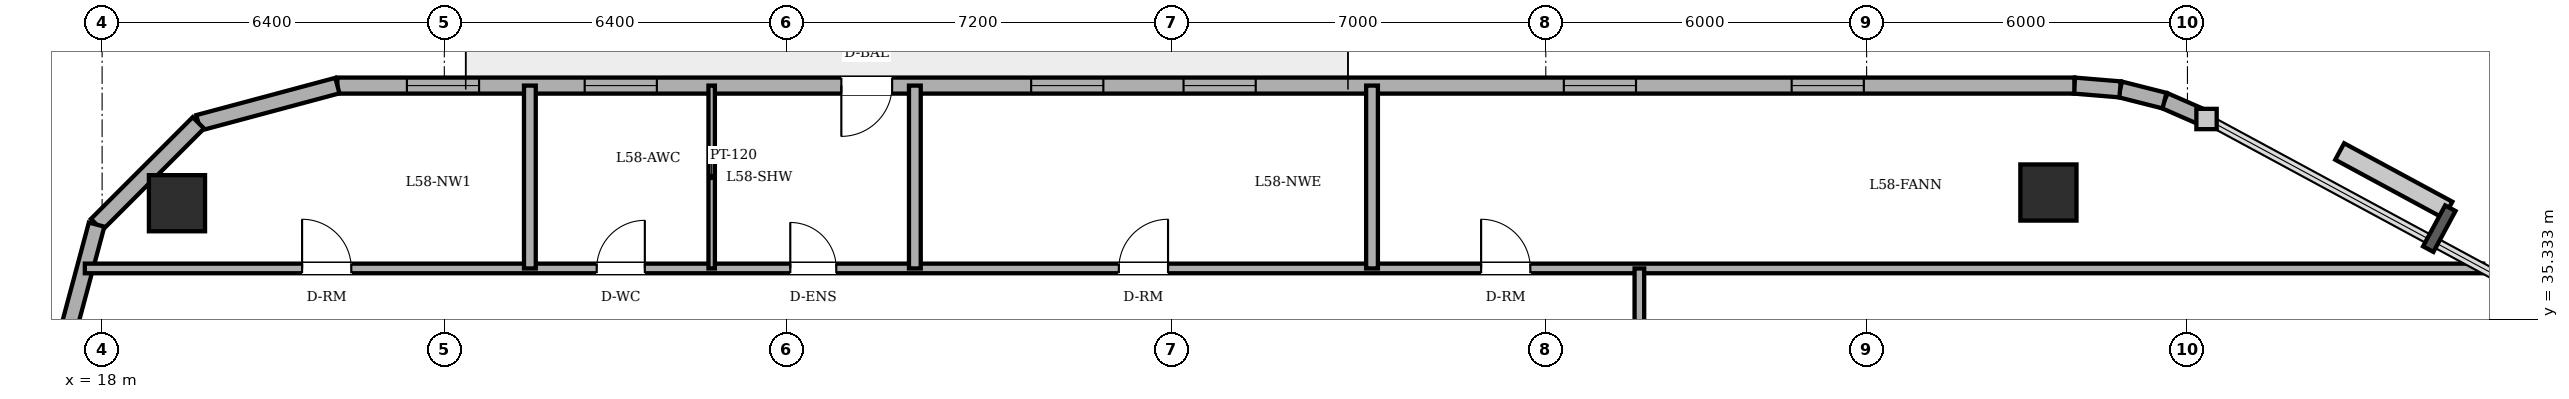
"""IFC4 building model, lengths in metres.
Left out: names, types, materials, properties, quantities, classifications, styles, units other than length and angle.
Written with IfcOpenShell. Run it as: python <this file> out.ifc"""

import sys

from ifc_helpers import new_model, si_unit, direction, frame, frame_2d, origin, origin_2d, place, context, subcontext, project, spatial, rectangle, circle, extrude, element, fill, save


model = new_model("IFC4")
c1 = context("Model", 3, precision=1e-05, world=origin(), true_north=direction((0.0, 1.0)))
c2 = subcontext(c1, "Body", "Model", "MODEL_VIEW")
j1 = project(units=[si_unit("LENGTHUNIT", "METRE"), si_unit("PLANEANGLEUNIT", "RADIAN")], contexts=[c1])
p1 = place(None, origin())
s1 = spatial("IfcSite", under=j1, at=p1, CompositionType="ELEMENT")
p2 = place(p1, origin())
s2 = spatial("IfcBuilding", under=s1, at=p2, CompositionType="ELEMENT")
p3 = place(p2, frame((0.0, 0.0, 222.9)))
s3 = spatial("IfcBuildingStorey", under=s2, at=p3, CompositionType="ELEMENT", Elevation=222.9)
for number, where, z_axis, x_axis in (
    (1, (54.4, 37.7, 0.0), (0.0, 0.0, 1.0), (1.0, 0.0, 0.0)),
    (2, (19.4, 37.5, 0.0), (0.0, 0.0, 1.0), (1.0, 0.0, 0.0)),
):
    element("IfcColumn", number, at=place(p3, frame(where, z_axis=z_axis, x_axis=x_axis)), inside=s3, PredefinedType="COLUMN", context=c2, shape_type="SweptSolid", body=[
        extrude(circle(Radius=0.525, at=origin_2d()), origin(), (0.0, 0.0, 1.0), 3.6),
    ])
p4 = place(p3, frame((57.357, 39.075, 0.0), z_axis=(0.0, 0.0, 1.0), x_axis=(-0.916085473636, 0.400983048261, 0.0)))
e3 = element("IfcWall", 3, at=p4, inside=s3, PredefinedType="SOLIDWALL", context=c2, shape_type="SweptSolid", body=[
    extrude(rectangle(XDim=0.858, YDim=0.3, at=frame_2d((0.429, 0.0))), origin(), (0.0, 0.0, 1.0), 3.4),
])
p5 = place(p3, frame((56.571, 39.419, 0.0), z_axis=(0.0, 0.0, 1.0), x_axis=(-0.969536346338, 0.244947490555, 0.0)))
e4 = element("IfcWall", 4, at=p5, inside=s3, PredefinedType="SOLIDWALL", context=c2, shape_type="SweptSolid", body=[
    extrude(rectangle(XDim=0.857, YDim=0.3, at=frame_2d((0.429, 0.0))), origin(), (0.0, 0.0, 1.0), 3.4),
])
p6 = place(p3, frame((55.74, 39.629, 0.0), z_axis=(0.0, 0.0, 1.0), x_axis=(-0.996565355958, 0.082809971041, 0.0)))
e5 = element("IfcWall", 5, at=p6, inside=s3, PredefinedType="SOLIDWALL", context=c2, shape_type="SweptSolid", body=[
    extrude(rectangle(XDim=0.858, YDim=0.3, at=frame_2d((0.429, 0.0))), origin(), (0.0, 0.0, 1.0), 3.4),
])
p7 = place(p3, frame((54.885, 39.7, 0.0), z_axis=(0.0, 0.0, 1.0), x_axis=(-1.0, 0.0, 0.0)))
e6 = element("IfcWall", 6, at=p7, inside=s3, PredefinedType="SOLIDWALL", context=c2, shape_type="SweptSolid", body=[
    extrude(rectangle(XDim=32.485, YDim=0.3, at=frame_2d((16.243, 0.0))), origin(), (0.0, 0.0, 1.0), 3.4),
])
p8 = place(p7, frame((22.11, 0.0, 0.0)))
e7 = element("IfcOpeningElement", 7, at=p8, cuts=e6, PredefinedType="OPENING", context=c2, shape_type="SweptSolid", body=[
    extrude(rectangle(XDim=0.95, YDim=2.2, at=frame_2d((0.475, 1.1))), frame((0.0, 0.16, 0.0), z_axis=(0.0, -1.0, 0.0), x_axis=(1.0, 0.0, 0.0)), (0.0, 0.0, 1.0), 0.32),
])
p9 = place(p7, frame((3.937, 0.0, 0.85)))
e8 = element("IfcOpeningElement", 8, at=p9, cuts=e6, PredefinedType="OPENING", context=c2, shape_type="SweptSolid", body=[
    extrude(rectangle(XDim=1.35, YDim=1.55, at=frame_2d((0.675, 0.775))), frame((0.0, 0.16, 0.0), z_axis=(0.0, -1.0, 0.0), x_axis=(1.0, 0.0, 0.0)), (0.0, 0.0, 1.0), 0.32),
])
p10 = place(p7, frame((8.198, 0.0, 0.85)))
e9 = element("IfcOpeningElement", 9, at=p10, cuts=e6, PredefinedType="OPENING", context=c2, shape_type="SweptSolid", body=[
    extrude(rectangle(XDim=1.35, YDim=1.55, at=frame_2d((0.675, 0.775))), frame((0.0, 0.16, 0.0), z_axis=(0.0, -1.0, 0.0), x_axis=(1.0, 0.0, 0.0)), (0.0, 0.0, 1.0), 0.32),
])
p11 = place(p7, frame((15.31, 0.0, 0.85)))
e10 = element("IfcOpeningElement", 10, at=p11, cuts=e6, PredefinedType="OPENING", context=c2, shape_type="SweptSolid", body=[
    extrude(rectangle(XDim=1.35, YDim=1.55, at=frame_2d((0.675, 0.775))), frame((0.0, 0.16, 0.0), z_axis=(0.0, -1.0, 0.0), x_axis=(1.0, 0.0, 0.0)), (0.0, 0.0, 1.0), 0.32),
])
p12 = place(p7, frame((18.16, 0.0, 0.85)))
e11 = element("IfcOpeningElement", 11, at=p12, cuts=e6, PredefinedType="OPENING", context=c2, shape_type="SweptSolid", body=[
    extrude(rectangle(XDim=1.35, YDim=1.55, at=frame_2d((0.675, 0.775))), frame((0.0, 0.16, 0.0), z_axis=(0.0, -1.0, 0.0), x_axis=(1.0, 0.0, 0.0)), (0.0, 0.0, 1.0), 0.32),
])
p13 = place(p7, frame((26.51, 0.0, 0.85)))
e12 = element("IfcOpeningElement", 12, at=p13, cuts=e6, PredefinedType="OPENING", context=c2, shape_type="SweptSolid", body=[
    extrude(rectangle(XDim=1.35, YDim=1.55, at=frame_2d((0.675, 0.775))), frame((0.0, 0.16, 0.0), z_axis=(0.0, -1.0, 0.0), x_axis=(1.0, 0.0, 0.0)), (0.0, 0.0, 1.0), 0.32),
])
p14 = place(p7, frame((29.835, 0.0, 0.85)))
e13 = element("IfcOpeningElement", 13, at=p14, cuts=e6, PredefinedType="OPENING", context=c2, shape_type="SweptSolid", body=[
    extrude(rectangle(XDim=1.35, YDim=1.55, at=frame_2d((0.675, 0.775))), frame((0.0, 0.16, 0.0), z_axis=(0.0, -1.0, 0.0), x_axis=(1.0, 0.0, 0.0)), (0.0, 0.0, 1.0), 0.32),
])
p15 = place(p3, frame((22.4, 39.7, 0.0), z_axis=(0.0, 0.0, 1.0), x_axis=(-0.965889330541, -0.258955210695, 0.0)))
e14 = element("IfcWall", 14, at=p15, inside=s3, PredefinedType="SOLIDWALL", context=c2, shape_type="SweptSolid", body=[
    extrude(rectangle(XDim=2.692, YDim=0.3, at=frame_2d((1.346, 0.0))), origin(), (0.0, 0.0, 1.0), 3.4),
])
p16 = place(p3, frame((19.8, 39.003, 0.0), z_axis=(0.0, 0.0, 1.0), x_axis=(-0.707152139074, -0.70706142039, 0.0)))
e15 = element("IfcWall", 15, at=p16, inside=s3, PredefinedType="SOLIDWALL", context=c2, shape_type="SweptSolid", body=[
    extrude(rectangle(XDim=2.691, YDim=0.3, at=frame_2d((1.346, 0.0))), origin(), (0.0, 0.0, 1.0), 3.4),
])
p17 = place(p3, frame((17.897, 37.1, 0.0), z_axis=(0.0, 0.0, 1.0), x_axis=(-0.258932525951, -0.965895412042, 0.0)))
e16 = element("IfcWall", 16, at=p17, inside=s3, PredefinedType="SOLIDWALL", context=c2, shape_type="SweptSolid", body=[
    extrude(rectangle(XDim=2.692, YDim=0.3, at=frame_2d((1.346, 0.0))), origin(), (0.0, 0.0, 1.0), 3.4),
])
p18 = place(p3, frame((17.677, 36.28, 0.0), z_axis=(0.0, 0.0, 1.0), x_axis=(1.0, 0.0, 0.0)))
e17 = element("IfcWall", 17, at=p18, inside=s3, PredefinedType="PARTITIONING", context=c2, shape_type="SweptSolid", body=[
    extrude(rectangle(XDim=44.853, YDim=0.18, at=frame_2d((22.427, 0.0))), origin(), (0.0, 0.0, 1.0), 3.4),
])
p19 = place(p18, frame((9.573, 0.0, 0.0)))
e18 = element("IfcOpeningElement", 18, at=p19, cuts=e17, PredefinedType="OPENING", context=c2, shape_type="SweptSolid", body=[
    extrude(rectangle(XDim=0.9, YDim=2.1, at=frame_2d((0.45, 1.05))), frame((0.0, 0.1, 0.0), z_axis=(0.0, -1.0, 0.0), x_axis=(1.0, 0.0, 0.0)), (0.0, 0.0, 1.0), 0.2),
])
p20 = place(p18, frame((13.193, 0.0, 0.0)))
e19 = element("IfcOpeningElement", 19, at=p20, cuts=e17, PredefinedType="OPENING", context=c2, shape_type="SweptSolid", body=[
    extrude(rectangle(XDim=0.86, YDim=2.1, at=frame_2d((0.43, 1.05))), frame((0.0, 0.1, 0.0), z_axis=(0.0, -1.0, 0.0), x_axis=(1.0, 0.0, 0.0)), (0.0, 0.0, 1.0), 0.2),
])
p21 = place(p18, frame((26.113, 0.0, 0.0)))
e20 = element("IfcOpeningElement", 20, at=p21, cuts=e17, PredefinedType="OPENING", context=c2, shape_type="SweptSolid", body=[
    extrude(rectangle(XDim=0.92, YDim=2.1, at=frame_2d((0.46, 1.05))), frame((0.0, 0.1, 0.0), z_axis=(0.0, -1.0, 0.0), x_axis=(1.0, 0.0, 0.0)), (0.0, 0.0, 1.0), 0.2),
])
p22 = place(p18, frame((4.063, 0.0, 0.0)))
e21 = element("IfcOpeningElement", 21, at=p22, cuts=e17, PredefinedType="OPENING", context=c2, shape_type="SweptSolid", body=[
    extrude(rectangle(XDim=0.92, YDim=2.1, at=frame_2d((0.46, 1.05))), frame((0.0, 0.1, 0.0), z_axis=(0.0, -1.0, 0.0), x_axis=(1.0, 0.0, 0.0)), (0.0, 0.0, 1.0), 0.2),
])
p23 = place(p18, frame((19.338, 0.0, 0.0)))
e22 = element("IfcOpeningElement", 22, at=p23, cuts=e17, PredefinedType="OPENING", context=c2, shape_type="SweptSolid", body=[
    extrude(rectangle(XDim=0.92, YDim=2.1, at=frame_2d((0.46, 1.05))), frame((0.0, 0.1, 0.0), z_axis=(0.0, -1.0, 0.0), x_axis=(1.0, 0.0, 0.0)), (0.0, 0.0, 1.0), 0.2),
])
p24 = place(p3, frame((26.0, 36.28, 0.0), z_axis=(0.0, 0.0, 1.0), x_axis=(0.0, 1.0, 0.0)))
e23 = element("IfcWall", 23, at=p24, inside=s3, PredefinedType="PARTITIONING", context=c2, shape_type="SweptSolid", body=[
    extrude(rectangle(XDim=3.42, YDim=0.22, at=frame_2d((1.71, 0.0))), origin(), (0.0, 0.0, 1.0), 3.4),
])
p25 = place(p3, frame((29.4, 36.28, 0.0), z_axis=(0.0, 0.0, 1.0), x_axis=(0.0, 1.0, 0.0)))
e24 = element("IfcWall", 24, at=p25, inside=s3, PredefinedType="PARTITIONING", context=c2, shape_type="SweptSolid", body=[
    extrude(rectangle(XDim=3.42, YDim=0.12, at=frame_2d((1.71, 0.0))), origin(), (0.0, 0.0, 1.0), 3.4),
])
for number, where, z_axis, x_axis in (
    (25, (33.2, 36.28, 0.0), (0.0, 0.0, 1.0), (0.0, 1.0, 0.0)),
    (26, (41.75, 36.28, 0.0), (0.0, 0.0, 1.0), (0.0, 1.0, 0.0)),
):
    element("IfcWall", number, at=place(p3, frame(where, z_axis=z_axis, x_axis=x_axis)), inside=s3, PredefinedType="PARTITIONING", context=c2, shape_type="SweptSolid", body=[
        extrude(rectangle(XDim=3.42, YDim=0.22, at=frame_2d((1.71, 0.0))), origin(), (0.0, 0.0, 1.0), 3.4),
    ])
p26 = place(p3, frame((46.75, 33.82, 0.0), z_axis=(0.0, 0.0, 1.0), x_axis=(0.0, 1.0, 0.0)))
e27 = element("IfcWall", 27, at=p26, inside=s3, PredefinedType="PARTITIONING", context=c2, shape_type="SweptSolid", body=[
    extrude(rectangle(XDim=2.46, YDim=0.18, at=frame_2d((1.23, 0.0))), origin(), (0.0, 0.0, 1.0), 3.4),
])
p27 = place(p8, origin())
e28 = element("IfcDoor", 28, at=p27, inside=s3, OperationType="SINGLE_SWING_RIGHT", PredefinedType="DOOR", context=c2, shape_type="SweptSolid", body=[
    extrude(rectangle(XDim=0.95, YDim=2.2, at=frame_2d((0.475, 1.1))), frame((0.0, 0.025, 0.0), z_axis=(0.0, -1.0, 0.0), x_axis=(1.0, 0.0, 0.0)), (0.0, 0.0, 1.0), 0.05),
])
fill(e7, e28)
p28 = place(p9, origin())
e29 = element("IfcWindow", 29, at=p28, inside=s3, PartitioningType="SINGLE_PANEL", PredefinedType="WINDOW", context=c2, shape_type="SweptSolid", body=[
    extrude(rectangle(XDim=1.35, YDim=1.55, at=frame_2d((0.675, 0.775))), frame((0.0, 0.03, 0.0), z_axis=(0.0, -1.0, 0.0), x_axis=(1.0, 0.0, 0.0)), (0.0, 0.0, 1.0), 0.06),
])
fill(e8, e29)
p29 = place(p10, origin())
e30 = element("IfcWindow", 30, at=p29, inside=s3, PartitioningType="SINGLE_PANEL", PredefinedType="WINDOW", context=c2, shape_type="SweptSolid", body=[
    extrude(rectangle(XDim=1.35, YDim=1.55, at=frame_2d((0.675, 0.775))), frame((0.0, 0.03, 0.0), z_axis=(0.0, -1.0, 0.0), x_axis=(1.0, 0.0, 0.0)), (0.0, 0.0, 1.0), 0.06),
])
fill(e9, e30)
p30 = place(p11, origin())
e31 = element("IfcWindow", 31, at=p30, inside=s3, PartitioningType="SINGLE_PANEL", PredefinedType="WINDOW", context=c2, shape_type="SweptSolid", body=[
    extrude(rectangle(XDim=1.35, YDim=1.55, at=frame_2d((0.675, 0.775))), frame((0.0, 0.03, 0.0), z_axis=(0.0, -1.0, 0.0), x_axis=(1.0, 0.0, 0.0)), (0.0, 0.0, 1.0), 0.06),
])
fill(e10, e31)
p31 = place(p12, origin())
e32 = element("IfcWindow", 32, at=p31, inside=s3, PartitioningType="SINGLE_PANEL", PredefinedType="WINDOW", context=c2, shape_type="SweptSolid", body=[
    extrude(rectangle(XDim=1.35, YDim=1.55, at=frame_2d((0.675, 0.775))), frame((0.0, 0.03, 0.0), z_axis=(0.0, -1.0, 0.0), x_axis=(1.0, 0.0, 0.0)), (0.0, 0.0, 1.0), 0.06),
])
fill(e11, e32)
p32 = place(p13, origin())
e33 = element("IfcWindow", 33, at=p32, inside=s3, PartitioningType="SINGLE_PANEL", PredefinedType="WINDOW", context=c2, shape_type="SweptSolid", body=[
    extrude(rectangle(XDim=1.35, YDim=1.55, at=frame_2d((0.675, 0.775))), frame((0.0, 0.03, 0.0), z_axis=(0.0, -1.0, 0.0), x_axis=(1.0, 0.0, 0.0)), (0.0, 0.0, 1.0), 0.06),
])
fill(e12, e33)
p33 = place(p14, origin())
e34 = element("IfcWindow", 34, at=p33, inside=s3, PartitioningType="SINGLE_PANEL", PredefinedType="WINDOW", context=c2, shape_type="SweptSolid", body=[
    extrude(rectangle(XDim=1.35, YDim=1.55, at=frame_2d((0.675, 0.775))), frame((0.0, 0.03, 0.0), z_axis=(0.0, -1.0, 0.0), x_axis=(1.0, 0.0, 0.0)), (0.0, 0.0, 1.0), 0.06),
])
fill(e13, e34)
p34 = place(p19, origin())
e35 = element("IfcDoor", 35, at=p34, inside=s3, OperationType="SINGLE_SWING_RIGHT", PredefinedType="DOOR", context=c2, shape_type="SweptSolid", body=[
    extrude(rectangle(XDim=0.9, YDim=2.1, at=frame_2d((0.45, 1.05))), frame((0.0, 0.025, 0.0), z_axis=(0.0, -1.0, 0.0), x_axis=(1.0, 0.0, 0.0)), (0.0, 0.0, 1.0), 0.05),
])
fill(e18, e35)
p35 = place(p20, origin())
e36 = element("IfcDoor", 36, at=p35, inside=s3, OperationType="SINGLE_SWING_LEFT", PredefinedType="DOOR", context=c2, shape_type="SweptSolid", body=[
    extrude(rectangle(XDim=0.86, YDim=2.1, at=frame_2d((0.43, 1.05))), frame((0.0, 0.025, 0.0), z_axis=(0.0, -1.0, 0.0), x_axis=(1.0, 0.0, 0.0)), (0.0, 0.0, 1.0), 0.05),
])
fill(e19, e36)
p36 = place(p21, origin())
e37 = element("IfcDoor", 37, at=p36, inside=s3, OperationType="SINGLE_SWING_LEFT", PredefinedType="DOOR", context=c2, shape_type="SweptSolid", body=[
    extrude(rectangle(XDim=0.92, YDim=2.1, at=frame_2d((0.46, 1.05))), frame((0.0, 0.025, 0.0), z_axis=(0.0, -1.0, 0.0), x_axis=(1.0, 0.0, 0.0)), (0.0, 0.0, 1.0), 0.05),
])
fill(e20, e37)
p37 = place(p22, origin())
e38 = element("IfcDoor", 38, at=p37, inside=s3, OperationType="SINGLE_SWING_LEFT", PredefinedType="DOOR", context=c2, shape_type="SweptSolid", body=[
    extrude(rectangle(XDim=0.92, YDim=2.1, at=frame_2d((0.46, 1.05))), frame((0.0, 0.025, 0.0), z_axis=(0.0, -1.0, 0.0), x_axis=(1.0, 0.0, 0.0)), (0.0, 0.0, 1.0), 0.05),
])
fill(e21, e38)
p38 = place(p23, origin())
e39 = element("IfcDoor", 39, at=p38, inside=s3, OperationType="SINGLE_SWING_RIGHT", PredefinedType="DOOR", context=c2, shape_type="SweptSolid", body=[
    extrude(rectangle(XDim=0.92, YDim=2.1, at=frame_2d((0.46, 1.05))), frame((0.0, 0.025, 0.0), z_axis=(0.0, -1.0, 0.0), x_axis=(1.0, 0.0, 0.0)), (0.0, 0.0, 1.0), 0.05),
])
fill(e22, e39)
save(model, sys.argv[1])
